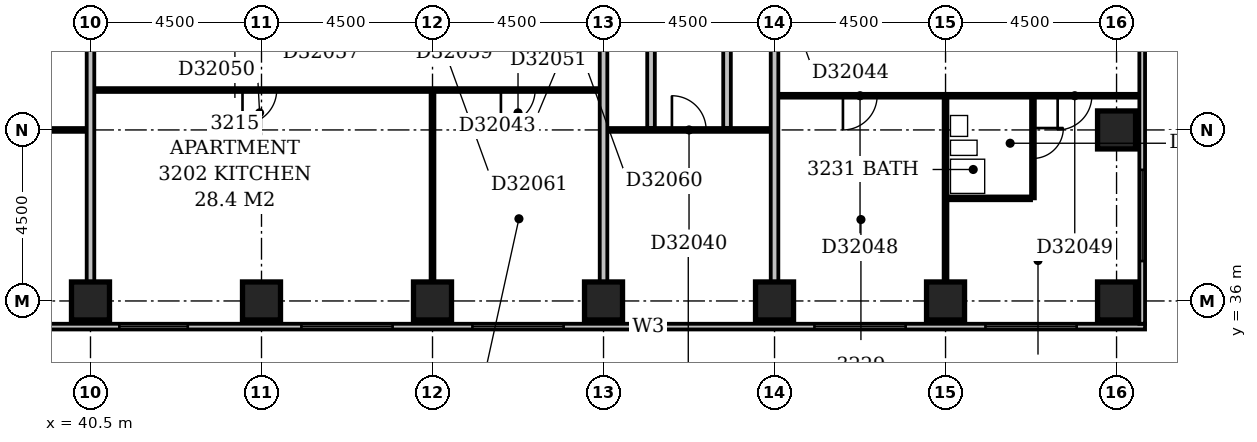
"""IFC4 building model, lengths in metres.
Left out: names, types, materials, properties, quantities, classifications, styles, units other than length and angle.
Written with IfcOpenShell. Run it as: python <this file> out.ifc"""

import sys

from ifc_helpers import new_model, si_unit, direction, frame, frame_2d, origin, origin_2d, place, context, subcontext, project, spatial, rectangle, extrude, element, fill, save


model = new_model("IFC4")
c1 = context("Model", 3, precision=1e-05, world=origin(), true_north=direction((0.0, 1.0)))
c2 = subcontext(c1, "Body", "Model", "MODEL_VIEW")
j1 = project(units=[si_unit("LENGTHUNIT", "METRE"), si_unit("PLANEANGLEUNIT", "RADIAN")], contexts=[c1])
p1 = place(None, origin())
s1 = spatial("IfcSite", under=j1, at=p1, CompositionType="ELEMENT")
p2 = place(p1, origin())
s2 = spatial("IfcBuilding", under=s1, at=p2, CompositionType="ELEMENT")
p3 = place(p2, frame((0.0, 0.0, 130.4)))
s3 = spatial("IfcBuildingStorey", under=s2, at=p3, CompositionType="ELEMENT", Elevation=130.4)
for number, where, z_axis, x_axis in (
    (1, (40.5, 36.0, -0.3), (0.0, 0.0, 1.0), (1.0, 0.0, 0.0)),
    (2, (45.0, 36.0, -0.3), (0.0, 0.0, 1.0), (1.0, 0.0, 0.0)),
    (3, (49.5, 36.0, -0.3), (0.0, 0.0, 1.0), (1.0, 0.0, 0.0)),
    (4, (54.0, 36.0, -0.3), (0.0, 0.0, 1.0), (1.0, 0.0, 0.0)),
    (5, (58.5, 36.0, -0.3), (0.0, 0.0, 1.0), (1.0, 0.0, 0.0)),
    (6, (63.0, 36.0, -0.3), (0.0, 0.0, 1.0), (1.0, 0.0, 0.0)),
    (7, (67.5, 36.0, -0.3), (0.0, 0.0, 1.0), (1.0, 0.0, 0.0)),
    (8, (67.5, 40.5, -0.3), (0.0, 0.0, 1.0), (1.0, 0.0, 0.0)),
):
    element("IfcColumn", number, at=place(p3, frame(where, z_axis=z_axis, x_axis=x_axis)), inside=s3, PredefinedType="COLUMN", context=c2, shape_type="SweptSolid", body=[
        extrude(rectangle(XDim=1.0, YDim=1.0, at=origin_2d()), origin(), (0.0, 0.0, 1.0), 3.6),
    ])
p4 = place(p3, frame((23.1, 35.325, 0.0), z_axis=(0.0, 0.0, 1.0), x_axis=(1.0, 0.0, 0.0)))
e9 = element("IfcWall", 9, at=p4, inside=s3, PredefinedType="STANDARD", context=c2, shape_type="SweptSolid", body=[
    extrude(rectangle(XDim=45.15, YDim=0.15, at=frame_2d((22.575, 0.0))), origin(), (0.0, 0.0, 1.0), 2.7),
])
p5 = place(p4, frame((0.45, 0.0, 0.6)))
e10 = element("IfcOpeningElement", 10, at=p5, cuts=e9, PredefinedType="OPENING", context=c2, shape_type="SweptSolid", body=[
    extrude(rectangle(XDim=2.4, YDim=1.8, at=frame_2d((1.2, 0.9))), frame((0.0, 0.087, 0.0), z_axis=(0.0, -1.0, 0.0), x_axis=(1.0, 0.0, 0.0)), (0.0, 0.0, 1.0), 0.174),
])
p6 = place(p4, frame((6.417, 0.0, 0.6)))
e11 = element("IfcOpeningElement", 11, at=p6, cuts=e9, PredefinedType="OPENING", context=c2, shape_type="SweptSolid", body=[
    extrude(rectangle(XDim=1.2, YDim=1.8, at=frame_2d((0.6, 0.9))), frame((0.0, 0.087, 0.0), z_axis=(0.0, -1.0, 0.0), x_axis=(1.0, 0.0, 0.0)), (0.0, 0.0, 1.0), 0.174),
])
p7 = place(p4, frame((9.45, 0.0, 0.6)))
e12 = element("IfcOpeningElement", 12, at=p7, cuts=e9, PredefinedType="OPENING", context=c2, shape_type="SweptSolid", body=[
    extrude(rectangle(XDim=2.4, YDim=1.8, at=frame_2d((1.2, 0.9))), frame((0.0, 0.087, 0.0), z_axis=(0.0, -1.0, 0.0), x_axis=(1.0, 0.0, 0.0)), (0.0, 0.0, 1.0), 0.174),
])
p8 = place(p4, frame((13.95, 0.0, 0.6)))
e13 = element("IfcOpeningElement", 13, at=p8, cuts=e9, PredefinedType="OPENING", context=c2, shape_type="SweptSolid", body=[
    extrude(rectangle(XDim=2.4, YDim=1.8, at=frame_2d((1.2, 0.9))), frame((0.0, 0.087, 0.0), z_axis=(0.0, -1.0, 0.0), x_axis=(1.0, 0.0, 0.0)), (0.0, 0.0, 1.0), 0.174),
])
p9 = place(p4, frame((18.16, 0.0, 0.6)))
e14 = element("IfcOpeningElement", 14, at=p9, cuts=e9, PredefinedType="OPENING", context=c2, shape_type="SweptSolid", body=[
    extrude(rectangle(XDim=1.8, YDim=1.8, at=frame_2d((0.9, 0.9))), frame((0.0, 0.087, 0.0), z_axis=(0.0, -1.0, 0.0), x_axis=(1.0, 0.0, 0.0)), (0.0, 0.0, 1.0), 0.174),
])
p10 = place(p4, frame((22.95, 0.0, 0.6)))
e15 = element("IfcOpeningElement", 15, at=p10, cuts=e9, PredefinedType="OPENING", context=c2, shape_type="SweptSolid", body=[
    extrude(rectangle(XDim=2.4, YDim=1.8, at=frame_2d((1.2, 0.9))), frame((0.0, 0.087, 0.0), z_axis=(0.0, -1.0, 0.0), x_axis=(1.0, 0.0, 0.0)), (0.0, 0.0, 1.0), 0.174),
])
p11 = place(p4, frame((27.45, 0.0, 0.6)))
e16 = element("IfcOpeningElement", 16, at=p11, cuts=e9, PredefinedType="OPENING", context=c2, shape_type="SweptSolid", body=[
    extrude(rectangle(XDim=2.4, YDim=1.8, at=frame_2d((1.2, 0.9))), frame((0.0, 0.087, 0.0), z_axis=(0.0, -1.0, 0.0), x_axis=(1.0, 0.0, 0.0)), (0.0, 0.0, 1.0), 0.174),
])
p12 = place(p4, frame((31.631, 0.0, 0.6)))
e17 = element("IfcOpeningElement", 17, at=p12, cuts=e9, PredefinedType="OPENING", context=c2, shape_type="SweptSolid", body=[
    extrude(rectangle(XDim=0.9, YDim=1.8, at=frame_2d((0.45, 0.9))), frame((0.0, 0.087, 0.0), z_axis=(0.0, -1.0, 0.0), x_axis=(1.0, 0.0, 0.0)), (0.0, 0.0, 1.0), 0.174),
])
p13 = place(p4, frame((36.45, 0.0, 0.6)))
e18 = element("IfcOpeningElement", 18, at=p13, cuts=e9, PredefinedType="OPENING", context=c2, shape_type="SweptSolid", body=[
    extrude(rectangle(XDim=2.4, YDim=1.8, at=frame_2d((1.2, 0.9))), frame((0.0, 0.087, 0.0), z_axis=(0.0, -1.0, 0.0), x_axis=(1.0, 0.0, 0.0)), (0.0, 0.0, 1.0), 0.174),
])
p14 = place(p4, frame((40.95, 0.0, 0.6)))
e19 = element("IfcOpeningElement", 19, at=p14, cuts=e9, PredefinedType="OPENING", context=c2, shape_type="SweptSolid", body=[
    extrude(rectangle(XDim=2.4, YDim=1.8, at=frame_2d((1.2, 0.9))), frame((0.0, 0.087, 0.0), z_axis=(0.0, -1.0, 0.0), x_axis=(1.0, 0.0, 0.0)), (0.0, 0.0, 1.0), 0.174),
])
p15 = place(p3, frame((68.175, 35.4, 0.0), z_axis=(0.0, 0.0, 1.0), x_axis=(0.0, 1.0, 0.0)))
e20 = element("IfcWall", 20, at=p15, inside=s3, PredefinedType="STANDARD", context=c2, shape_type="SweptSolid", body=[
    extrude(rectangle(XDim=23.85, YDim=0.15, at=frame_2d((11.925, 0.0))), origin(), (0.0, 0.0, 1.0), 2.7),
])
p16 = place(p15, frame((1.65, 0.0, 0.6)))
e21 = element("IfcOpeningElement", 21, at=p16, cuts=e20, PredefinedType="OPENING", context=c2, shape_type="SweptSolid", body=[
    extrude(rectangle(XDim=2.4, YDim=1.8, at=frame_2d((1.2, 0.9))), frame((0.0, 0.087, 0.0), z_axis=(0.0, -1.0, 0.0), x_axis=(1.0, 0.0, 0.0)), (0.0, 0.0, 1.0), 0.174),
])
p17 = place(p15, frame((10.65, 0.0, 0.6)))
e22 = element("IfcOpeningElement", 22, at=p17, cuts=e20, PredefinedType="OPENING", context=c2, shape_type="SweptSolid", body=[
    extrude(rectangle(XDim=2.4, YDim=1.8, at=frame_2d((1.2, 0.9))), frame((0.0, 0.087, 0.0), z_axis=(0.0, -1.0, 0.0), x_axis=(1.0, 0.0, 0.0)), (0.0, 0.0, 1.0), 0.174),
])
p18 = place(p3, frame((40.5, 36.5, 0.0), z_axis=(0.0, 0.0, 1.0), x_axis=(0.0, 1.0, 0.0)))
e23 = element("IfcWall", 23, at=p18, inside=s3, PredefinedType="PARTITIONING", context=c2, shape_type="SweptSolid", body=[
    extrude(rectangle(XDim=12.9, YDim=0.2, at=frame_2d((6.45, 0.0))), origin(), (0.0, 0.0, 1.0), 3.3),
])
p19 = place(p3, frame((49.5, 36.5, 0.0), z_axis=(0.0, 0.0, 1.0), x_axis=(0.0, 1.0, 0.0)))
e24 = element("IfcWall", 24, at=p19, inside=s3, PredefinedType="PARTITIONING", context=c2, shape_type="SweptSolid", body=[
    extrude(rectangle(XDim=5.0, YDim=0.1, at=frame_2d((2.5, 0.0))), origin(), (0.0, 0.0, 1.0), 3.3),
])
p20 = place(p3, frame((54.0, 36.5, 0.0), z_axis=(0.0, 0.0, 1.0), x_axis=(0.0, 1.0, 0.0)))
e25 = element("IfcWall", 25, at=p20, inside=s3, PredefinedType="PARTITIONING", context=c2, shape_type="SweptSolid", body=[
    extrude(rectangle(XDim=12.9, YDim=0.2, at=frame_2d((6.45, 0.0))), origin(), (0.0, 0.0, 1.0), 2.6),
])
p21 = place(p3, frame((58.5, 36.5, 0.0), z_axis=(0.0, 0.0, 1.0), x_axis=(0.0, 1.0, 0.0)))
e26 = element("IfcWall", 26, at=p21, inside=s3, PredefinedType="PARTITIONING", context=c2, shape_type="SweptSolid", body=[
    extrude(rectangle(XDim=12.9, YDim=0.2, at=frame_2d((6.45, 0.0))), origin(), (0.0, 0.0, 1.0), 3.3),
])
p22 = place(p3, frame((63.0, 36.5, 0.0), z_axis=(0.0, 0.0, 1.0), x_axis=(0.0, 1.0, 0.0)))
e27 = element("IfcWall", 27, at=p22, inside=s3, PredefinedType="PARTITIONING", context=c2, shape_type="SweptSolid", body=[
    extrude(rectangle(XDim=4.85, YDim=0.1, at=frame_2d((2.425, 0.0))), origin(), (0.0, 0.0, 1.0), 2.4),
])
p23 = place(p3, frame((63.05, 38.7, 0.0), z_axis=(0.0, 0.0, 1.0), x_axis=(1.0, 0.0, 0.0)))
e28 = element("IfcWall", 28, at=p23, inside=s3, PredefinedType="PLUMBINGWALL", context=c2, shape_type="SweptSolid", body=[
    extrude(rectangle(XDim=2.2, YDim=0.1, at=frame_2d((1.1, 0.0))), origin(), (0.0, 0.0, 1.0), 3.3),
])
p24 = place(p3, frame((65.3, 38.7, 0.0), z_axis=(0.0, 0.0, 1.0), x_axis=(0.0, 1.0, 0.0)))
e29 = element("IfcWall", 29, at=p24, inside=s3, PredefinedType="PLUMBINGWALL", context=c2, shape_type="SweptSolid", body=[
    extrude(rectangle(XDim=2.65, YDim=0.1, at=frame_2d((1.325, 0.0))), origin(), (0.0, 0.0, 1.0), 3.3),
])
p25 = place(p24, frame((1.05, 0.0, 0.0)))
e30 = element("IfcOpeningElement", 30, at=p25, cuts=e29, PredefinedType="OPENING", context=c2, shape_type="SweptSolid", body=[
    extrude(rectangle(XDim=0.8, YDim=2.1, at=frame_2d((0.4, 1.05))), frame((0.0, 0.062, 0.0), z_axis=(0.0, -1.0, 0.0), x_axis=(1.0, 0.0, 0.0)), (0.0, 0.0, 1.0), 0.124),
])
p26 = place(p3, frame((36.1, 40.5, 0.0), z_axis=(0.0, 0.0, 1.0), x_axis=(1.0, 0.0, 0.0)))
e31 = element("IfcWall", 31, at=p26, inside=s3, PredefinedType="PARTITIONING", context=c2, shape_type="SweptSolid", body=[
    extrude(rectangle(XDim=4.3, YDim=0.1, at=frame_2d((2.15, 0.0))), origin(), (0.0, 0.0, 1.0), 3.3),
])
p27 = place(p26, frame((1.7, 0.0, 0.0)))
e32 = element("IfcOpeningElement", 32, at=p27, cuts=e31, PredefinedType="OPENING", context=c2, shape_type="SweptSolid", body=[
    extrude(rectangle(XDim=0.9, YDim=2.1, at=frame_2d((0.45, 1.05))), frame((0.0, 0.062, 0.0), z_axis=(0.0, -1.0, 0.0), x_axis=(1.0, 0.0, 0.0)), (0.0, 0.0, 1.0), 0.124),
])
p28 = place(p3, frame((54.1, 40.5, 0.0), z_axis=(0.0, 0.0, 1.0), x_axis=(1.0, 0.0, 0.0)))
e33 = element("IfcWall", 33, at=p28, inside=s3, PredefinedType="PARTITIONING", context=c2, shape_type="SweptSolid", body=[
    extrude(rectangle(XDim=4.3, YDim=0.1, at=frame_2d((2.15, 0.0))), origin(), (0.0, 0.0, 1.0), 3.3),
])
p29 = place(p28, frame((1.7, 0.0, 0.0)))
e34 = element("IfcOpeningElement", 34, at=p29, cuts=e33, PredefinedType="OPENING", context=c2, shape_type="SweptSolid", body=[
    extrude(rectangle(XDim=0.9, YDim=2.1, at=frame_2d((0.45, 1.05))), frame((0.0, 0.062, 0.0), z_axis=(0.0, -1.0, 0.0), x_axis=(1.0, 0.0, 0.0)), (0.0, 0.0, 1.0), 0.124),
])
p30 = place(p3, frame((55.25, 40.55, 0.0), z_axis=(0.0, 0.0, 1.0), x_axis=(0.0, 1.0, 0.0)))
e35 = element("IfcWall", 35, at=p30, inside=s3, PredefinedType="PARTITIONING", context=c2, shape_type="SweptSolid", body=[
    extrude(rectangle(XDim=8.95, YDim=0.2, at=frame_2d((4.475, 0.0))), origin(), (0.0, 0.0, 1.0), 3.3),
])
p31 = place(p30, frame((5.55, 0.0, 0.0)))
e36 = element("IfcOpeningElement", 36, at=p31, cuts=e35, PredefinedType="OPENING", context=c2, shape_type="SweptSolid", body=[
    extrude(rectangle(XDim=0.8, YDim=2.1, at=frame_2d((0.4, 1.05))), frame((0.0, 0.112, 0.0), z_axis=(0.0, -1.0, 0.0), x_axis=(1.0, 0.0, 0.0)), (0.0, 0.0, 1.0), 0.224),
])
p32 = place(p3, frame((57.25, 40.55, 0.0), z_axis=(0.0, 0.0, 1.0), x_axis=(0.0, 1.0, 0.0)))
e37 = element("IfcWall", 37, at=p32, inside=s3, PredefinedType="PARTITIONING", context=c2, shape_type="SweptSolid", body=[
    extrude(rectangle(XDim=8.95, YDim=0.2, at=frame_2d((4.475, 0.0))), origin(), (0.0, 0.0, 1.0), 3.3),
])
p33 = place(p32, frame((5.55, 0.0, 0.0)))
e38 = element("IfcOpeningElement", 38, at=p33, cuts=e37, PredefinedType="OPENING", context=c2, shape_type="SweptSolid", body=[
    extrude(rectangle(XDim=0.8, YDim=2.1, at=frame_2d((0.4, 1.05))), frame((0.0, 0.112, 0.0), z_axis=(0.0, -1.0, 0.0), x_axis=(1.0, 0.0, 0.0)), (0.0, 0.0, 1.0), 0.224),
])
p34 = place(p3, frame((58.6, 41.4, 0.0), z_axis=(0.0, 0.0, 1.0), x_axis=(1.0, 0.0, 0.0)))
e39 = element("IfcWall", 39, at=p34, inside=s3, PredefinedType="PARTITIONING", context=c2, shape_type="SweptSolid", body=[
    extrude(rectangle(XDim=9.5, YDim=0.1, at=frame_2d((4.75, 0.0))), origin(), (0.0, 0.0, 1.0), 3.3),
])
p35 = place(p34, frame((1.7, 0.0, 0.0)))
e40 = element("IfcOpeningElement", 40, at=p35, cuts=e39, PredefinedType="OPENING", context=c2, shape_type="SweptSolid", body=[
    extrude(rectangle(XDim=0.9, YDim=2.1, at=frame_2d((0.45, 1.05))), frame((0.0, 0.062, 0.0), z_axis=(0.0, -1.0, 0.0), x_axis=(1.0, 0.0, 0.0)), (0.0, 0.0, 1.0), 0.124),
])
p36 = place(p34, frame((7.35, 0.0, 0.0)))
e41 = element("IfcOpeningElement", 41, at=p36, cuts=e39, PredefinedType="OPENING", context=c2, shape_type="SweptSolid", body=[
    extrude(rectangle(XDim=0.9, YDim=2.1, at=frame_2d((0.45, 1.05))), frame((0.0, 0.062, 0.0), z_axis=(0.0, -1.0, 0.0), x_axis=(1.0, 0.0, 0.0)), (0.0, 0.0, 1.0), 0.124),
])
p37 = place(p3, frame((40.6, 41.55, 0.0), z_axis=(0.0, 0.0, 1.0), x_axis=(1.0, 0.0, 0.0)))
e42 = element("IfcWall", 42, at=p37, inside=s3, PredefinedType="PARTITIONING", context=c2, shape_type="SweptSolid", body=[
    extrude(rectangle(XDim=13.3, YDim=0.1, at=frame_2d((6.65, 0.0))), origin(), (0.0, 0.0, 1.0), 3.3),
])
p38 = place(p37, frame((3.9, 0.0, 0.0)))
e43 = element("IfcOpeningElement", 43, at=p38, cuts=e42, PredefinedType="OPENING", context=c2, shape_type="SweptSolid", body=[
    extrude(rectangle(XDim=0.9, YDim=2.1, at=frame_2d((0.45, 1.05))), frame((0.0, 0.062, 0.0), z_axis=(0.0, -1.0, 0.0), x_axis=(1.0, 0.0, 0.0)), (0.0, 0.0, 1.0), 0.124),
])
p39 = place(p37, frame((10.7, 0.0, 0.0)))
e44 = element("IfcOpeningElement", 44, at=p39, cuts=e42, PredefinedType="OPENING", context=c2, shape_type="SweptSolid", body=[
    extrude(rectangle(XDim=0.9, YDim=2.1, at=frame_2d((0.45, 1.05))), frame((0.0, 0.062, 0.0), z_axis=(0.0, -1.0, 0.0), x_axis=(1.0, 0.0, 0.0)), (0.0, 0.0, 1.0), 0.124),
])
p40 = place(p9, origin())
e45 = element("IfcWindow", 45, at=p40, inside=s3, PartitioningType="SINGLE_PANEL", PredefinedType="WINDOW", context=c2, shape_type="SweptSolid", body=[
    extrude(rectangle(XDim=1.8, YDim=1.8, at=frame_2d((0.9, 0.9))), frame((0.0, 0.03, 0.0), z_axis=(0.0, -1.0, 0.0), x_axis=(1.0, 0.0, 0.0)), (0.0, 0.0, 1.0), 0.06),
])
fill(e14, e45)
p41 = place(p10, origin())
e46 = element("IfcWindow", 46, at=p41, inside=s3, PartitioningType="SINGLE_PANEL", PredefinedType="WINDOW", context=c2, shape_type="SweptSolid", body=[
    extrude(rectangle(XDim=2.4, YDim=1.8, at=frame_2d((1.2, 0.9))), frame((0.0, 0.03, 0.0), z_axis=(0.0, -1.0, 0.0), x_axis=(1.0, 0.0, 0.0)), (0.0, 0.0, 1.0), 0.06),
])
fill(e15, e46)
p42 = place(p11, origin())
e47 = element("IfcWindow", 47, at=p42, inside=s3, PartitioningType="SINGLE_PANEL", PredefinedType="WINDOW", context=c2, shape_type="SweptSolid", body=[
    extrude(rectangle(XDim=2.4, YDim=1.8, at=frame_2d((1.2, 0.9))), frame((0.0, 0.03, 0.0), z_axis=(0.0, -1.0, 0.0), x_axis=(1.0, 0.0, 0.0)), (0.0, 0.0, 1.0), 0.06),
])
fill(e16, e47)
p43 = place(p12, origin())
e48 = element("IfcWindow", 48, at=p43, inside=s3, PartitioningType="SINGLE_PANEL", PredefinedType="WINDOW", context=c2, shape_type="SweptSolid", body=[
    extrude(rectangle(XDim=0.9, YDim=1.8, at=frame_2d((0.45, 0.9))), frame((0.0, 0.03, 0.0), z_axis=(0.0, -1.0, 0.0), x_axis=(1.0, 0.0, 0.0)), (0.0, 0.0, 1.0), 0.06),
])
fill(e17, e48)
p44 = place(p13, origin())
e49 = element("IfcWindow", 49, at=p44, inside=s3, PartitioningType="SINGLE_PANEL", PredefinedType="WINDOW", context=c2, shape_type="SweptSolid", body=[
    extrude(rectangle(XDim=2.4, YDim=1.8, at=frame_2d((1.2, 0.9))), frame((0.0, 0.03, 0.0), z_axis=(0.0, -1.0, 0.0), x_axis=(1.0, 0.0, 0.0)), (0.0, 0.0, 1.0), 0.06),
])
fill(e18, e49)
p45 = place(p14, origin())
e50 = element("IfcWindow", 50, at=p45, inside=s3, PartitioningType="SINGLE_PANEL", PredefinedType="WINDOW", context=c2, shape_type="SweptSolid", body=[
    extrude(rectangle(XDim=2.4, YDim=1.8, at=frame_2d((1.2, 0.9))), frame((0.0, 0.03, 0.0), z_axis=(0.0, -1.0, 0.0), x_axis=(1.0, 0.0, 0.0)), (0.0, 0.0, 1.0), 0.06),
])
fill(e19, e50)
p46 = place(p16, origin())
e51 = element("IfcWindow", 51, at=p46, inside=s3, PartitioningType="SINGLE_PANEL", PredefinedType="WINDOW", context=c2, shape_type="SweptSolid", body=[
    extrude(rectangle(XDim=2.4, YDim=1.8, at=frame_2d((1.2, 0.9))), frame((0.0, 0.03, 0.0), z_axis=(0.0, -1.0, 0.0), x_axis=(1.0, 0.0, 0.0)), (0.0, 0.0, 1.0), 0.06),
])
fill(e21, e51)
p47 = place(p25, origin())
e52 = element("IfcDoor", 52, at=p47, inside=s3, OperationType="SINGLE_SWING_RIGHT", PredefinedType="DOOR", context=c2, shape_type="SweptSolid", body=[
    extrude(rectangle(XDim=0.8, YDim=2.1, at=frame_2d((0.4, 1.05))), frame((0.0, 0.025, 0.0), z_axis=(0.0, -1.0, 0.0), x_axis=(1.0, 0.0, 0.0)), (0.0, 0.0, 1.0), 0.05),
])
fill(e30, e52)
p48 = place(p29, origin())
e53 = element("IfcDoor", 53, at=p48, inside=s3, OperationType="SINGLE_SWING_LEFT", PredefinedType="DOOR", context=c2, shape_type="SweptSolid", body=[
    extrude(rectangle(XDim=0.9, YDim=2.1, at=frame_2d((0.45, 1.05))), frame((0.0, 0.025, 0.0), z_axis=(0.0, -1.0, 0.0), x_axis=(1.0, 0.0, 0.0)), (0.0, 0.0, 1.0), 0.05),
])
fill(e34, e53)
p49 = place(p35, frame((0.9, 0.0, 0.0), z_axis=(0.0, 0.0, 1.0), x_axis=(-1.0, 0.0, 0.0)))
e54 = element("IfcDoor", 54, at=p49, inside=s3, OperationType="SINGLE_SWING_RIGHT", PredefinedType="DOOR", context=c2, shape_type="SweptSolid", body=[
    extrude(rectangle(XDim=0.9, YDim=2.1, at=frame_2d((0.45, 1.05))), frame((0.0, 0.025, 0.0), z_axis=(0.0, -1.0, 0.0), x_axis=(1.0, 0.0, 0.0)), (0.0, 0.0, 1.0), 0.05),
])
fill(e40, e54)
p50 = place(p36, frame((0.9, 0.0, 0.0), z_axis=(0.0, 0.0, 1.0), x_axis=(-1.0, 0.0, 0.0)))
e55 = element("IfcDoor", 55, at=p50, inside=s3, OperationType="SINGLE_SWING_RIGHT", PredefinedType="DOOR", context=c2, shape_type="SweptSolid", body=[
    extrude(rectangle(XDim=0.9, YDim=2.1, at=frame_2d((0.45, 1.05))), frame((0.0, 0.025, 0.0), z_axis=(0.0, -1.0, 0.0), x_axis=(1.0, 0.0, 0.0)), (0.0, 0.0, 1.0), 0.05),
])
fill(e41, e55)
p51 = place(p38, frame((0.9, 0.0, 0.0), z_axis=(0.0, 0.0, 1.0), x_axis=(-1.0, 0.0, 0.0)))
e56 = element("IfcDoor", 56, at=p51, inside=s3, OperationType="SINGLE_SWING_RIGHT", PredefinedType="DOOR", context=c2, shape_type="SweptSolid", body=[
    extrude(rectangle(XDim=0.9, YDim=2.1, at=frame_2d((0.45, 1.05))), frame((0.0, 0.025, 0.0), z_axis=(0.0, -1.0, 0.0), x_axis=(1.0, 0.0, 0.0)), (0.0, 0.0, 1.0), 0.05),
])
fill(e43, e56)
p52 = place(p39, frame((0.9, 0.0, 0.0), z_axis=(0.0, 0.0, 1.0), x_axis=(-1.0, 0.0, 0.0)))
e57 = element("IfcDoor", 57, at=p52, inside=s3, OperationType="SINGLE_SWING_RIGHT", PredefinedType="DOOR", context=c2, shape_type="SweptSolid", body=[
    extrude(rectangle(XDim=0.9, YDim=2.1, at=frame_2d((0.45, 1.05))), frame((0.0, 0.025, 0.0), z_axis=(0.0, -1.0, 0.0), x_axis=(1.0, 0.0, 0.0)), (0.0, 0.0, 1.0), 0.05),
])
fill(e44, e57)
save(model, sys.argv[1])
